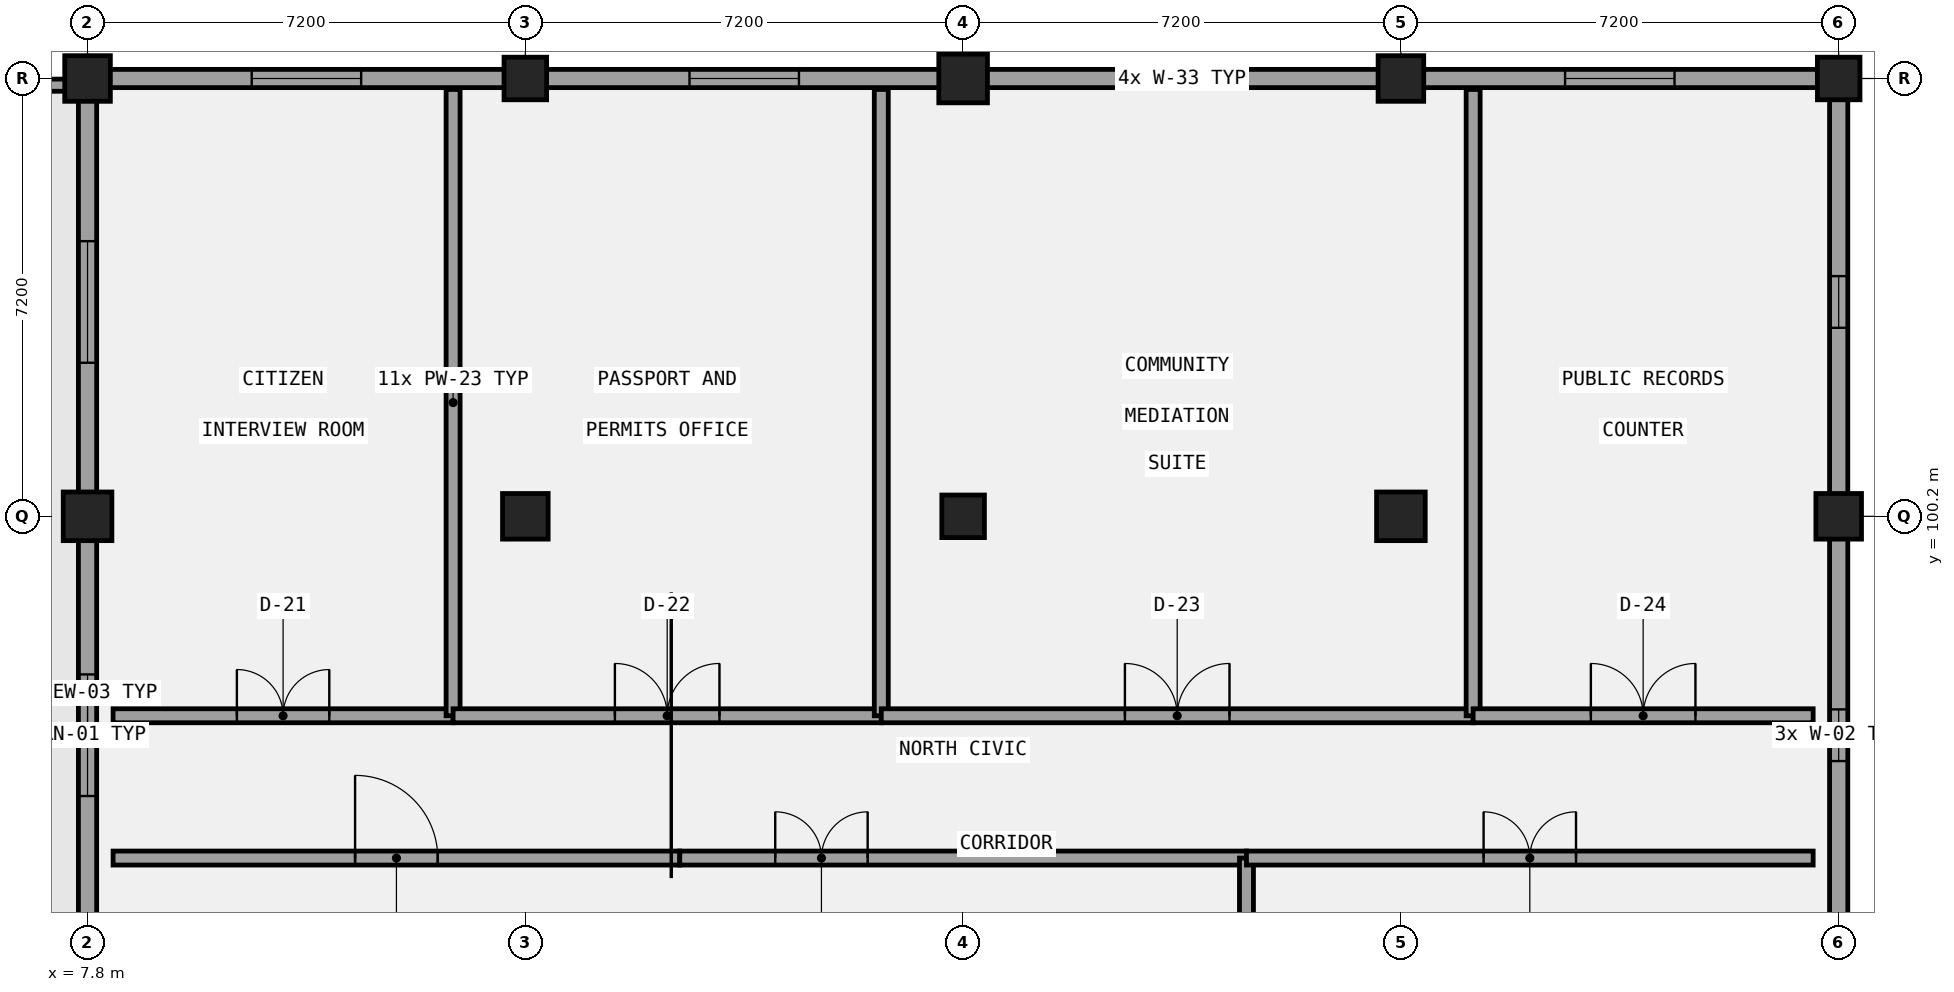
"""IFC4 building model, lengths in metres.
Left out: names, types, materials, properties, quantities, classifications, styles, units other than length and angle.
Written with IfcOpenShell. Run it as: python <this file> out.ifc"""

import sys

from ifc_helpers import new_model, si_unit, direction, frame, frame_2d, origin, origin_2d, place, context, subcontext, project, spatial, rectangle, extrude, element, fill, save


model = new_model("IFC4")
c1 = context("Model", 3, precision=1e-05, world=origin(), true_north=direction((0.0, 1.0)))
c2 = subcontext(c1, "Body", "Model", "MODEL_VIEW")
j1 = project(units=[si_unit("LENGTHUNIT", "METRE"), si_unit("PLANEANGLEUNIT", "RADIAN")], contexts=[c1])
p1 = place(None, origin())
s1 = spatial("IfcSite", under=j1, at=p1, CompositionType="ELEMENT")
p2 = place(p1, origin())
s2 = spatial("IfcBuilding", under=s1, at=p2, CompositionType="ELEMENT")
p3 = place(p2, frame((0.0, 0.0, 5.4)))
s3 = spatial("IfcBuildingStorey", under=s2, at=p3, CompositionType="ELEMENT", Elevation=5.4)
p4 = place(p3, frame((7.8, 100.2, 0.0), z_axis=(0.0, 0.0, 1.0), x_axis=(1.0, 0.0, 0.0)))
e1 = element("IfcColumn", 1, at=p4, inside=s3, PredefinedType="COLUMN", context=c2, shape_type="SweptSolid", body=[
    extrude(rectangle(XDim=0.8, YDim=0.8, at=origin_2d()), origin(), (0.0, 0.0, 1.0), 4.2),
])
for number, where, z_axis, x_axis in (
    (2, (7.8, 107.4, 0.0), (0.0, 0.0, 1.0), (1.0, 0.0, 0.0)),
    (3, (15.0, 100.2, 0.0), (0.0, 0.0, 1.0), (1.0, 0.0, 0.0)),
):
    element("IfcColumn", number, at=place(p3, frame(where, z_axis=z_axis, x_axis=x_axis)), inside=s3, PredefinedType="COLUMN", context=c2, shape_type="SweptSolid", body=[
        extrude(rectangle(XDim=0.75, YDim=0.75, at=origin_2d()), origin(), (0.0, 0.0, 1.0), 4.2),
    ])
for number, where, z_axis, x_axis in (
    (4, (15.0, 107.4, 0.0), (0.0, 0.0, 1.0), (1.0, 0.0, 0.0)),
    (5, (22.2, 100.2, 0.0), (0.0, 0.0, 1.0), (1.0, 0.0, 0.0)),
):
    element("IfcColumn", number, at=place(p3, frame(where, z_axis=z_axis, x_axis=x_axis)), inside=s3, PredefinedType="COLUMN", context=c2, shape_type="SweptSolid", body=[
        extrude(rectangle(XDim=0.7, YDim=0.7, at=origin_2d()), origin(), (0.0, 0.0, 1.0), 4.2),
    ])
for number, where, z_axis, x_axis in (
    (6, (22.2, 107.4, 0.0), (0.0, 0.0, 1.0), (1.0, 0.0, 0.0)),
    (7, (29.4, 100.2, 0.0), (0.0, 0.0, 1.0), (1.0, 0.0, 0.0)),
):
    element("IfcColumn", number, at=place(p3, frame(where, z_axis=z_axis, x_axis=x_axis)), inside=s3, PredefinedType="COLUMN", context=c2, shape_type="SweptSolid", body=[
        extrude(rectangle(XDim=0.8, YDim=0.8, at=origin_2d()), origin(), (0.0, 0.0, 1.0), 4.2),
    ])
for number, where, z_axis, x_axis in (
    (8, (29.4, 107.4, 0.0), (0.0, 0.0, 1.0), (1.0, 0.0, 0.0)),
    (9, (36.6, 100.2, 0.0), (0.0, 0.0, 1.0), (1.0, 0.0, 0.0)),
):
    element("IfcColumn", number, at=place(p3, frame(where, z_axis=z_axis, x_axis=x_axis)), inside=s3, PredefinedType="COLUMN", context=c2, shape_type="SweptSolid", body=[
        extrude(rectangle(XDim=0.75, YDim=0.75, at=origin_2d()), origin(), (0.0, 0.0, 1.0), 4.2),
    ])
p5 = place(p3, frame((36.6, 107.4, 0.0), z_axis=(0.0, 0.0, 1.0), x_axis=(1.0, 0.0, 0.0)))
e10 = element("IfcColumn", 10, at=p5, inside=s3, PredefinedType="COLUMN", context=c2, shape_type="SweptSolid", body=[
    extrude(rectangle(XDim=0.7, YDim=0.7, at=origin_2d()), origin(), (0.0, 0.0, 1.0), 4.2),
])
p6 = place(p3, frame((36.6, 85.95, 0.0), z_axis=(0.0, 0.0, 1.0), x_axis=(0.0, 1.0, 0.0)))
e11 = element("IfcWall", 11, at=p6, inside=s3, PredefinedType="SOLIDWALL", context=c2, shape_type="SweptSolid", body=[
    extrude(rectangle(XDim=21.3, YDim=0.3, at=frame_2d((10.65, 0.0))), origin(), (0.0, 0.0, 1.0), 3.02),
])
p7 = place(p6, frame((3.1, 0.0, 1.0)))
e12 = element("IfcOpeningElement", 12, at=p7, cuts=e11, PredefinedType="OPENING", context=c2, shape_type="SweptSolid", body=[
    extrude(rectangle(XDim=0.85, YDim=1.65, at=frame_2d((0.425, 0.825))), frame((0.0, 0.16, 0.0), z_axis=(0.0, -1.0, 0.0), x_axis=(1.0, 0.0, 0.0)), (0.0, 0.0, 1.0), 0.32),
])
p8 = place(p6, frame((10.225, 0.0, 1.0)))
e13 = element("IfcOpeningElement", 13, at=p8, cuts=e11, PredefinedType="OPENING", context=c2, shape_type="SweptSolid", body=[
    extrude(rectangle(XDim=0.85, YDim=1.65, at=frame_2d((0.425, 0.825))), frame((0.0, 0.16, 0.0), z_axis=(0.0, -1.0, 0.0), x_axis=(1.0, 0.0, 0.0)), (0.0, 0.0, 1.0), 0.32),
])
p9 = place(p6, frame((17.35, 0.0, 1.0)))
e14 = element("IfcOpeningElement", 14, at=p9, cuts=e11, PredefinedType="OPENING", context=c2, shape_type="SweptSolid", body=[
    extrude(rectangle(XDim=0.85, YDim=1.65, at=frame_2d((0.425, 0.825))), frame((0.0, 0.16, 0.0), z_axis=(0.0, -1.0, 0.0), x_axis=(1.0, 0.0, 0.0)), (0.0, 0.0, 1.0), 0.32),
])
p10 = place(p3, frame((36.75, 107.4, 0.0), z_axis=(0.0, 0.0, 1.0), x_axis=(-1.0, 0.0, 0.0)))
e15 = element("IfcWall", 15, at=p10, inside=s3, PredefinedType="SOLIDWALL", context=c2, shape_type="SweptSolid", body=[
    extrude(rectangle(XDim=29.1, YDim=0.3, at=frame_2d((14.55, 0.0))), origin(), (0.0, 0.0, 1.0), 3.17),
])
p11 = place(p10, frame((24.45, 0.0, 1.0)))
e16 = element("IfcOpeningElement", 16, at=p11, cuts=e15, PredefinedType="OPENING", context=c2, shape_type="SweptSolid", body=[
    extrude(rectangle(XDim=1.8, YDim=1.9, at=frame_2d((0.9, 0.95))), frame((0.0, 0.16, 0.0), z_axis=(0.0, -1.0, 0.0), x_axis=(1.0, 0.0, 0.0)), (0.0, 0.0, 1.0), 0.32),
])
p12 = place(p10, frame((17.25, 0.0, 1.0)))
e17 = element("IfcOpeningElement", 17, at=p12, cuts=e15, PredefinedType="OPENING", context=c2, shape_type="SweptSolid", body=[
    extrude(rectangle(XDim=1.8, YDim=1.9, at=frame_2d((0.9, 0.95))), frame((0.0, 0.16, 0.0), z_axis=(0.0, -1.0, 0.0), x_axis=(1.0, 0.0, 0.0)), (0.0, 0.0, 1.0), 0.32),
])
p13 = place(p10, frame((10.05, 0.0, 1.0)))
e18 = element("IfcOpeningElement", 18, at=p13, cuts=e15, PredefinedType="OPENING", context=c2, shape_type="SweptSolid", body=[
    extrude(rectangle(XDim=1.8, YDim=1.9, at=frame_2d((0.9, 0.95))), frame((0.0, 0.16, 0.0), z_axis=(0.0, -1.0, 0.0), x_axis=(1.0, 0.0, 0.0)), (0.0, 0.0, 1.0), 0.32),
])
p14 = place(p10, frame((2.85, 0.0, 1.0)))
e19 = element("IfcOpeningElement", 19, at=p14, cuts=e15, PredefinedType="OPENING", context=c2, shape_type="SweptSolid", body=[
    extrude(rectangle(XDim=1.8, YDim=1.9, at=frame_2d((0.9, 0.95))), frame((0.0, 0.16, 0.0), z_axis=(0.0, -1.0, 0.0), x_axis=(1.0, 0.0, 0.0)), (0.0, 0.0, 1.0), 0.32),
])
p15 = place(p3, frame((7.8, 107.25, 0.0), z_axis=(0.0, 0.0, 1.0), x_axis=(0.0, -1.0, 0.0)))
e20 = element("IfcWall", 20, at=p15, inside=s3, PredefinedType="SOLIDWALL", context=c2, shape_type="SweptSolid", body=[
    extrude(rectangle(XDim=21.3, YDim=0.3, at=frame_2d((10.65, 0.0))), origin(), (0.0, 0.0, 1.0), 3.17),
])
p16 = place(p15, frame((16.775, 0.0, 1.0)))
e21 = element("IfcOpeningElement", 21, at=p16, cuts=e20, PredefinedType="OPENING", context=c2, shape_type="SweptSolid", body=[
    extrude(rectangle(XDim=2.0, YDim=1.4, at=frame_2d((1.0, 0.7))), frame((0.0, 0.16, 0.0), z_axis=(0.0, -1.0, 0.0), x_axis=(1.0, 0.0, 0.0)), (0.0, 0.0, 1.0), 0.32),
])
p17 = place(p15, frame((9.65, 0.0, 1.0)))
e22 = element("IfcOpeningElement", 22, at=p17, cuts=e20, PredefinedType="OPENING", context=c2, shape_type="SweptSolid", body=[
    extrude(rectangle(XDim=2.0, YDim=1.4, at=frame_2d((1.0, 0.7))), frame((0.0, 0.16, 0.0), z_axis=(0.0, -1.0, 0.0), x_axis=(1.0, 0.0, 0.0)), (0.0, 0.0, 1.0), 0.32),
])
p18 = place(p15, frame((2.525, 0.0, 1.0)))
e23 = element("IfcOpeningElement", 23, at=p18, cuts=e20, PredefinedType="OPENING", context=c2, shape_type="SweptSolid", body=[
    extrude(rectangle(XDim=2.0, YDim=1.4, at=frame_2d((1.0, 0.7))), frame((0.0, 0.16, 0.0), z_axis=(0.0, -1.0, 0.0), x_axis=(1.0, 0.0, 0.0)), (0.0, 0.0, 1.0), 0.32),
])
p19 = place(p3, frame((0.11, 107.29, 0.0), z_axis=(0.0, 0.0, 1.0), x_axis=(1.0, 0.0, 0.0)))
e24 = element("IfcWall", 24, at=p19, inside=s3, PredefinedType="PARAPET", context=c2, shape_type="SweptSolid", body=[
    extrude(rectangle(XDim=7.47, YDim=0.2, at=frame_2d((3.735, 0.0))), origin(), (0.0, 0.0, 1.0), 1.12),
])
p20 = place(p3, frame((8.22, 94.58, 0.0), z_axis=(0.0, 0.0, 1.0), x_axis=(1.0, 0.0, 0.0)))
e25 = element("IfcWall", 25, at=p20, inside=s3, PredefinedType="PARTITIONING", context=c2, shape_type="SweptSolid", body=[
    extrude(rectangle(XDim=9.32, YDim=0.23, at=frame_2d((4.66, 0.0))), origin(), (0.0, 0.0, 1.0), 3.37),
])
p21 = place(p20, frame((3.98, 0.0, 0.0)))
e26 = element("IfcOpeningElement", 26, at=p21, cuts=e25, PredefinedType="OPENING", context=c2, shape_type="SweptSolid", body=[
    extrude(rectangle(XDim=1.36, YDim=2.35, at=frame_2d((0.68, 1.175))), frame((0.0, 0.125, 0.0), z_axis=(0.0, -1.0, 0.0), x_axis=(1.0, 0.0, 0.0)), (0.0, 0.0, 1.0), 0.25),
])
p22 = place(p3, frame((17.54, 94.58, 0.0), z_axis=(0.0, 0.0, 1.0), x_axis=(1.0, 0.0, 0.0)))
e27 = element("IfcWall", 27, at=p22, inside=s3, PredefinedType="PARTITIONING", context=c2, shape_type="SweptSolid", body=[
    extrude(rectangle(XDim=9.32, YDim=0.23, at=frame_2d((4.66, 0.0))), origin(), (0.0, 0.0, 1.0), 3.37),
])
p23 = place(p22, frame((1.57, 0.0, 0.0)))
e28 = element("IfcOpeningElement", 28, at=p23, cuts=e27, PredefinedType="OPENING", context=c2, shape_type="SweptSolid", body=[
    extrude(rectangle(XDim=1.52, YDim=2.1, at=frame_2d((0.76, 1.05))), frame((0.0, 0.125, 0.0), z_axis=(0.0, -1.0, 0.0), x_axis=(1.0, 0.0, 0.0)), (0.0, 0.0, 1.0), 0.25),
])
p24 = place(p3, frame((26.86, 85.98, 0.0), z_axis=(0.0, 0.0, 1.0), x_axis=(0.0, 1.0, 0.0)))
e29 = element("IfcWall", 29, at=p24, inside=s3, PredefinedType="PARTITIONING", context=c2, shape_type="SweptSolid", body=[
    extrude(rectangle(XDim=8.6, YDim=0.23, at=frame_2d((4.3, 0.0))), origin(), (0.0, 0.0, 1.0), 3.92),
])
p25 = place(p3, frame((26.86, 94.58, 0.0), z_axis=(0.0, 0.0, 1.0), x_axis=(1.0, 0.0, 0.0)))
e30 = element("IfcWall", 30, at=p25, inside=s3, PredefinedType="PARTITIONING", context=c2, shape_type="SweptSolid", body=[
    extrude(rectangle(XDim=9.32, YDim=0.23, at=frame_2d((4.66, 0.0))), origin(), (0.0, 0.0, 1.0), 3.37),
])
p26 = place(p25, frame((3.9, 0.0, 0.0)))
e31 = element("IfcOpeningElement", 31, at=p26, cuts=e30, PredefinedType="OPENING", context=c2, shape_type="SweptSolid", body=[
    extrude(rectangle(XDim=1.52, YDim=2.22, at=frame_2d((0.76, 1.11))), frame((0.0, 0.125, 0.0), z_axis=(0.0, -1.0, 0.0), x_axis=(1.0, 0.0, 0.0)), (0.0, 0.0, 1.0), 0.25),
])
p27 = place(p3, frame((8.22, 96.92, 0.0), z_axis=(0.0, 0.0, 1.0), x_axis=(1.0, 0.0, 0.0)))
e32 = element("IfcWall", 32, at=p27, inside=s3, PredefinedType="PARTITIONING", context=c2, shape_type="SweptSolid", body=[
    extrude(rectangle(XDim=5.592, YDim=0.23, at=frame_2d((2.796, 0.0))), origin(), (0.0, 0.0, 1.0), 3.92),
])
p28 = place(p27, frame((2.036, 0.0, 0.0)))
e33 = element("IfcOpeningElement", 33, at=p28, cuts=e32, PredefinedType="OPENING", context=c2, shape_type="SweptSolid", body=[
    extrude(rectangle(XDim=1.52, YDim=2.35, at=frame_2d((0.76, 1.175))), frame((0.0, 0.125, 0.0), z_axis=(0.0, -1.0, 0.0), x_axis=(1.0, 0.0, 0.0)), (0.0, 0.0, 1.0), 0.25),
])
p29 = place(p3, frame((13.812, 96.92, 0.0), z_axis=(0.0, 0.0, 1.0), x_axis=(0.0, 1.0, 0.0)))
e34 = element("IfcWall", 34, at=p29, inside=s3, PredefinedType="PARTITIONING", context=c2, shape_type="SweptSolid", body=[
    extrude(rectangle(XDim=10.3, YDim=0.23, at=frame_2d((5.15, 0.0))), origin(), (0.0, 0.0, 1.0), 3.92),
])
p30 = place(p3, frame((13.812, 96.92, 0.0), z_axis=(0.0, 0.0, 1.0), x_axis=(1.0, 0.0, 0.0)))
e35 = element("IfcWall", 35, at=p30, inside=s3, PredefinedType="PARTITIONING", context=c2, shape_type="SweptSolid", body=[
    extrude(rectangle(XDim=7.042, YDim=0.23, at=frame_2d((3.521, 0.0))), origin(), (0.0, 0.0, 1.0), 3.92),
])
p31 = place(p30, frame((2.661, 0.0, 0.0)))
e36 = element("IfcOpeningElement", 36, at=p31, cuts=e35, PredefinedType="OPENING", context=c2, shape_type="SweptSolid", body=[
    extrude(rectangle(XDim=1.72, YDim=2.1, at=frame_2d((0.86, 1.05))), frame((0.0, 0.125, 0.0), z_axis=(0.0, -1.0, 0.0), x_axis=(1.0, 0.0, 0.0)), (0.0, 0.0, 1.0), 0.25),
])
p32 = place(p3, frame((20.854, 96.92, 0.0), z_axis=(0.0, 0.0, 1.0), x_axis=(0.0, 1.0, 0.0)))
e37 = element("IfcWall", 37, at=p32, inside=s3, PredefinedType="PARTITIONING", context=c2, shape_type="SweptSolid", body=[
    extrude(rectangle(XDim=10.3, YDim=0.23, at=frame_2d((5.15, 0.0))), origin(), (0.0, 0.0, 1.0), 3.92),
])
p33 = place(p3, frame((20.854, 96.92, 0.0), z_axis=(0.0, 0.0, 1.0), x_axis=(1.0, 0.0, 0.0)))
e38 = element("IfcWall", 38, at=p33, inside=s3, PredefinedType="PARTITIONING", context=c2, shape_type="SweptSolid", body=[
    extrude(rectangle(XDim=9.734, YDim=0.23, at=frame_2d((4.867, 0.0))), origin(), (0.0, 0.0, 1.0), 3.92),
])
p34 = place(p33, frame((4.007, 0.0, 0.0)))
e39 = element("IfcOpeningElement", 39, at=p34, cuts=e38, PredefinedType="OPENING", context=c2, shape_type="SweptSolid", body=[
    extrude(rectangle(XDim=1.72, YDim=2.22, at=frame_2d((0.86, 1.11))), frame((0.0, 0.125, 0.0), z_axis=(0.0, -1.0, 0.0), x_axis=(1.0, 0.0, 0.0)), (0.0, 0.0, 1.0), 0.25),
])
p35 = place(p3, frame((30.588, 96.92, 0.0), z_axis=(0.0, 0.0, 1.0), x_axis=(0.0, 1.0, 0.0)))
e40 = element("IfcWall", 40, at=p35, inside=s3, PredefinedType="PARTITIONING", context=c2, shape_type="SweptSolid", body=[
    extrude(rectangle(XDim=10.3, YDim=0.23, at=frame_2d((5.15, 0.0))), origin(), (0.0, 0.0, 1.0), 3.92),
])
p36 = place(p3, frame((30.588, 96.92, 0.0), z_axis=(0.0, 0.0, 1.0), x_axis=(1.0, 0.0, 0.0)))
e41 = element("IfcWall", 41, at=p36, inside=s3, PredefinedType="PARTITIONING", context=c2, shape_type="SweptSolid", body=[
    extrude(rectangle(XDim=5.592, YDim=0.23, at=frame_2d((2.796, 0.0))), origin(), (0.0, 0.0, 1.0), 3.92),
])
p37 = place(p36, frame((1.936, 0.0, 0.0)))
e42 = element("IfcOpeningElement", 42, at=p37, cuts=e41, PredefinedType="OPENING", context=c2, shape_type="SweptSolid", body=[
    extrude(rectangle(XDim=1.72, YDim=2.35, at=frame_2d((0.86, 1.175))), frame((0.0, 0.125, 0.0), z_axis=(0.0, -1.0, 0.0), x_axis=(1.0, 0.0, 0.0)), (0.0, 0.0, 1.0), 0.25),
])
p38 = place(p8, origin())
e43 = element("IfcWindow", 43, at=p38, inside=s3, PartitioningType="SINGLE_PANEL", PredefinedType="WINDOW", context=c2, shape_type="SweptSolid", body=[
    extrude(rectangle(XDim=0.85, YDim=1.65, at=frame_2d((0.425, 0.825))), frame((0.0, 0.03, 0.0), z_axis=(0.0, -1.0, 0.0), x_axis=(1.0, 0.0, 0.0)), (0.0, 0.0, 1.0), 0.06),
])
fill(e13, e43)
p39 = place(p9, origin())
e44 = element("IfcWindow", 44, at=p39, inside=s3, PartitioningType="SINGLE_PANEL", PredefinedType="WINDOW", context=c2, shape_type="SweptSolid", body=[
    extrude(rectangle(XDim=0.85, YDim=1.65, at=frame_2d((0.425, 0.825))), frame((0.0, 0.03, 0.0), z_axis=(0.0, -1.0, 0.0), x_axis=(1.0, 0.0, 0.0)), (0.0, 0.0, 1.0), 0.06),
])
fill(e14, e44)
p40 = place(p11, origin())
e45 = element("IfcWindow", 45, at=p40, inside=s3, PartitioningType="SINGLE_PANEL", PredefinedType="WINDOW", context=c2, shape_type="SweptSolid", body=[
    extrude(rectangle(XDim=1.8, YDim=1.9, at=frame_2d((0.9, 0.95))), frame((0.0, 0.03, 0.0), z_axis=(0.0, -1.0, 0.0), x_axis=(1.0, 0.0, 0.0)), (0.0, 0.0, 1.0), 0.06),
])
fill(e16, e45)
p41 = place(p12, origin())
e46 = element("IfcWindow", 46, at=p41, inside=s3, PartitioningType="SINGLE_PANEL", PredefinedType="WINDOW", context=c2, shape_type="SweptSolid", body=[
    extrude(rectangle(XDim=1.8, YDim=1.9, at=frame_2d((0.9, 0.95))), frame((0.0, 0.03, 0.0), z_axis=(0.0, -1.0, 0.0), x_axis=(1.0, 0.0, 0.0)), (0.0, 0.0, 1.0), 0.06),
])
fill(e17, e46)
p42 = place(p13, origin())
e47 = element("IfcWindow", 47, at=p42, inside=s3, PartitioningType="SINGLE_PANEL", PredefinedType="WINDOW", context=c2, shape_type="SweptSolid", body=[
    extrude(rectangle(XDim=1.8, YDim=1.9, at=frame_2d((0.9, 0.95))), frame((0.0, 0.03, 0.0), z_axis=(0.0, -1.0, 0.0), x_axis=(1.0, 0.0, 0.0)), (0.0, 0.0, 1.0), 0.06),
])
fill(e18, e47)
p43 = place(p14, origin())
e48 = element("IfcWindow", 48, at=p43, inside=s3, PartitioningType="SINGLE_PANEL", PredefinedType="WINDOW", context=c2, shape_type="SweptSolid", body=[
    extrude(rectangle(XDim=1.8, YDim=1.9, at=frame_2d((0.9, 0.95))), frame((0.0, 0.03, 0.0), z_axis=(0.0, -1.0, 0.0), x_axis=(1.0, 0.0, 0.0)), (0.0, 0.0, 1.0), 0.06),
])
fill(e19, e48)
p44 = place(p17, origin())
e49 = element("IfcWindow", 49, at=p44, inside=s3, PartitioningType="SINGLE_PANEL", PredefinedType="WINDOW", context=c2, shape_type="SweptSolid", body=[
    extrude(rectangle(XDim=2.0, YDim=1.4, at=frame_2d((1.0, 0.7))), frame((0.0, 0.03, 0.0), z_axis=(0.0, -1.0, 0.0), x_axis=(1.0, 0.0, 0.0)), (0.0, 0.0, 1.0), 0.06),
])
fill(e22, e49)
p45 = place(p18, origin())
e50 = element("IfcWindow", 50, at=p45, inside=s3, PartitioningType="SINGLE_PANEL", PredefinedType="WINDOW", context=c2, shape_type="SweptSolid", body=[
    extrude(rectangle(XDim=2.0, YDim=1.4, at=frame_2d((1.0, 0.7))), frame((0.0, 0.03, 0.0), z_axis=(0.0, -1.0, 0.0), x_axis=(1.0, 0.0, 0.0)), (0.0, 0.0, 1.0), 0.06),
])
fill(e23, e50)
p46 = place(p21, frame((1.36, 0.0, 0.0), z_axis=(0.0, 0.0, 1.0), x_axis=(-1.0, 0.0, 0.0)))
e51 = element("IfcDoor", 51, at=p46, inside=s3, OperationType="SINGLE_SWING_LEFT", PredefinedType="DOOR", context=c2, shape_type="SweptSolid", body=[
    extrude(rectangle(XDim=1.36, YDim=2.35, at=frame_2d((0.68, 1.175))), frame((0.0, 0.025, 0.0), z_axis=(0.0, -1.0, 0.0), x_axis=(1.0, 0.0, 0.0)), (0.0, 0.0, 1.0), 0.05),
])
fill(e26, e51)
p47 = place(p23, frame((1.52, 0.0, 0.0), z_axis=(0.0, 0.0, 1.0), x_axis=(-1.0, 0.0, 0.0)))
e52 = element("IfcDoor", 52, at=p47, inside=s3, OperationType="DOUBLE_DOOR_SINGLE_SWING", PredefinedType="DOOR", context=c2, shape_type="SweptSolid", body=[
    extrude(rectangle(XDim=1.52, YDim=2.1, at=frame_2d((0.76, 1.05))), frame((0.0, 0.025, 0.0), z_axis=(0.0, -1.0, 0.0), x_axis=(1.0, 0.0, 0.0)), (0.0, 0.0, 1.0), 0.05),
])
fill(e28, e52)
p48 = place(p26, frame((1.52, 0.0, 0.0), z_axis=(0.0, 0.0, 1.0), x_axis=(-1.0, 0.0, 0.0)))
e53 = element("IfcDoor", 53, at=p48, inside=s3, OperationType="DOUBLE_DOOR_SINGLE_SWING", PredefinedType="DOOR", context=c2, shape_type="SweptSolid", body=[
    extrude(rectangle(XDim=1.52, YDim=2.22, at=frame_2d((0.76, 1.11))), frame((0.0, 0.025, 0.0), z_axis=(0.0, -1.0, 0.0), x_axis=(1.0, 0.0, 0.0)), (0.0, 0.0, 1.0), 0.05),
])
fill(e31, e53)
p49 = place(p28, origin())
e54 = element("IfcDoor", 54, at=p49, inside=s3, OperationType="DOUBLE_DOOR_SINGLE_SWING", PredefinedType="DOOR", context=c2, shape_type="SweptSolid", body=[
    extrude(rectangle(XDim=1.52, YDim=2.35, at=frame_2d((0.76, 1.175))), frame((0.0, 0.025, 0.0), z_axis=(0.0, -1.0, 0.0), x_axis=(1.0, 0.0, 0.0)), (0.0, 0.0, 1.0), 0.05),
])
fill(e33, e54)
p50 = place(p31, origin())
e55 = element("IfcDoor", 55, at=p50, inside=s3, OperationType="DOUBLE_DOOR_SINGLE_SWING", PredefinedType="DOOR", context=c2, shape_type="SweptSolid", body=[
    extrude(rectangle(XDim=1.72, YDim=2.1, at=frame_2d((0.86, 1.05))), frame((0.0, 0.025, 0.0), z_axis=(0.0, -1.0, 0.0), x_axis=(1.0, 0.0, 0.0)), (0.0, 0.0, 1.0), 0.05),
])
fill(e36, e55)
p51 = place(p34, origin())
e56 = element("IfcDoor", 56, at=p51, inside=s3, OperationType="DOUBLE_DOOR_SINGLE_SWING", PredefinedType="DOOR", context=c2, shape_type="SweptSolid", body=[
    extrude(rectangle(XDim=1.72, YDim=2.22, at=frame_2d((0.86, 1.11))), frame((0.0, 0.025, 0.0), z_axis=(0.0, -1.0, 0.0), x_axis=(1.0, 0.0, 0.0)), (0.0, 0.0, 1.0), 0.05),
])
fill(e39, e56)
p52 = place(p37, origin())
e57 = element("IfcDoor", 57, at=p52, inside=s3, OperationType="DOUBLE_DOOR_SINGLE_SWING", PredefinedType="DOOR", context=c2, shape_type="SweptSolid", body=[
    extrude(rectangle(XDim=1.72, YDim=2.35, at=frame_2d((0.86, 1.175))), frame((0.0, 0.025, 0.0), z_axis=(0.0, -1.0, 0.0), x_axis=(1.0, 0.0, 0.0)), (0.0, 0.0, 1.0), 0.05),
])
fill(e42, e57)
save(model, sys.argv[1])
